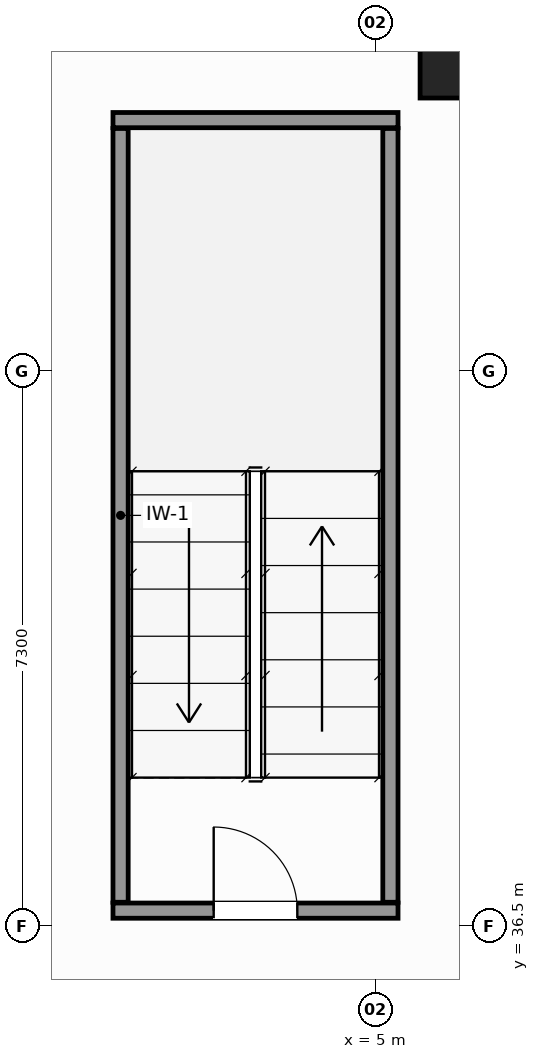
"""IFC4 building model, lengths in metres.
Left out: names, types, materials, properties, quantities, classifications, styles, units other than length and angle.
Written with IfcOpenShell. Run it as: python <this file> out.ifc"""

import sys

from ifc_helpers import new_model, si_unit, direction, frame, frame_2d, origin, origin_2d, place, context, subcontext, project, spatial, rectangle, hollow_circle, extrude, source, transform, mapped, element, fill, save


model = new_model("IFC4")
c1 = context("Model", 3, precision=1e-05, world=origin(), true_north=direction((0.0, 1.0)))
c2 = subcontext(c1, "Body", "Model", "MODEL_VIEW")
j1 = project(units=[si_unit("LENGTHUNIT", "METRE"), si_unit("PLANEANGLEUNIT", "RADIAN")], contexts=[c1])
p1 = place(None, origin())
s1 = spatial("IfcSite", under=j1, at=p1, CompositionType="ELEMENT")
p2 = place(p1, origin())
s2 = spatial("IfcBuilding", under=s1, at=p2, CompositionType="ELEMENT")
p3 = place(p2, frame((0.0, 0.0, 5.6)))
s3 = spatial("IfcBuildingStorey", under=s2, at=p3, CompositionType="ELEMENT", Elevation=5.6)
m1 = source(origin(), c2, "Body", "SweptSolid", [
    extrude(hollow_circle(Radius=0.61, WallThickness=0.05, at=origin_2d()), origin(), (0.0, 0.0, 1.0), 4.4),
])
p4 = place(p3, frame((6.2, 48.0, 0.0), z_axis=(0.0, 0.0, 1.0), x_axis=(1.0, 0.0, 0.0)))
e1 = element("IfcColumn", 1, at=p4, inside=s3, PredefinedType="COLUMN", context=c2, shape_type="MappedRepresentation", body=[
    mapped(m1, transform((0.0, 0.0, 0.0), scale=1.0)),
])
p5 = place(p3, frame((1.55, 36.7, 0.0), z_axis=(0.0, 0.0, 1.0), x_axis=(1.0, 0.0, 0.0)))
e2 = element("IfcWall", 2, at=p5, inside=s3, PredefinedType="SOLIDWALL", context=c2, shape_type="SweptSolid", body=[
    extrude(rectangle(XDim=3.75, YDim=0.2, at=frame_2d((1.875, 0.0))), origin(), (0.0, 0.0, 1.0), 4.4),
])
p6 = place(p5, frame((1.325, 0.0, 0.0)))
e3 = element("IfcOpeningElement", 3, at=p6, cuts=e2, PredefinedType="OPENING", context=c2, shape_type="SweptSolid", body=[
    extrude(rectangle(XDim=1.1, YDim=2.15, at=frame_2d((0.55, 1.075))), frame((0.0, 0.11, 0.0), z_axis=(0.0, -1.0, 0.0), x_axis=(1.0, 0.0, 0.0)), (0.0, 0.0, 1.0), 0.22),
])
p7 = place(p3, frame((1.55, 47.1, 0.0), z_axis=(0.0, 0.0, 1.0), x_axis=(1.0, 0.0, 0.0)))
e4 = element("IfcWall", 4, at=p7, inside=s3, PredefinedType="SOLIDWALL", context=c2, shape_type="SweptSolid", body=[
    extrude(rectangle(XDim=3.75, YDim=0.2, at=frame_2d((1.875, 0.0))), origin(), (0.0, 0.0, 1.0), 4.4),
])
for number, where, z_axis, x_axis in (
    (5, (1.65, 36.81, 0.0), (0.0, 0.0, 1.0), (0.0, 1.0, 0.0)),
    (6, (5.2, 36.81, 0.0), (0.0, 0.0, 1.0), (0.0, 1.0, 0.0)),
):
    element("IfcWall", number, at=place(p3, frame(where, z_axis=z_axis, x_axis=x_axis)), inside=s3, PredefinedType="SOLIDWALL", context=c2, shape_type="SweptSolid", body=[
        extrude(rectangle(XDim=10.18, YDim=0.2, at=frame_2d((5.09, 0.0))), origin(), (0.0, 0.0, 1.0), 4.4),
    ])
m2 = source(origin(), c2, "Body", "SweptSolid", [
    extrude(rectangle(XDim=1.1, YDim=2.15, at=frame_2d((0.55, 1.075))), frame((0.0, 0.025, 0.0), z_axis=(0.0, -1.0, 0.0), x_axis=(1.0, 0.0, 0.0)), (0.0, 0.0, 1.0), 0.05),
])
p8 = place(p6, origin())
e7 = element("IfcDoor", 7, at=p8, inside=s3, OperationType="SINGLE_SWING_LEFT", PredefinedType="DOOR", context=c2, shape_type="MappedRepresentation", body=[
    mapped(m2, transform((0.0, 0.0, 0.0), scale=1.0)),
])
fill(e3, e7)
save(model, sys.argv[1])
